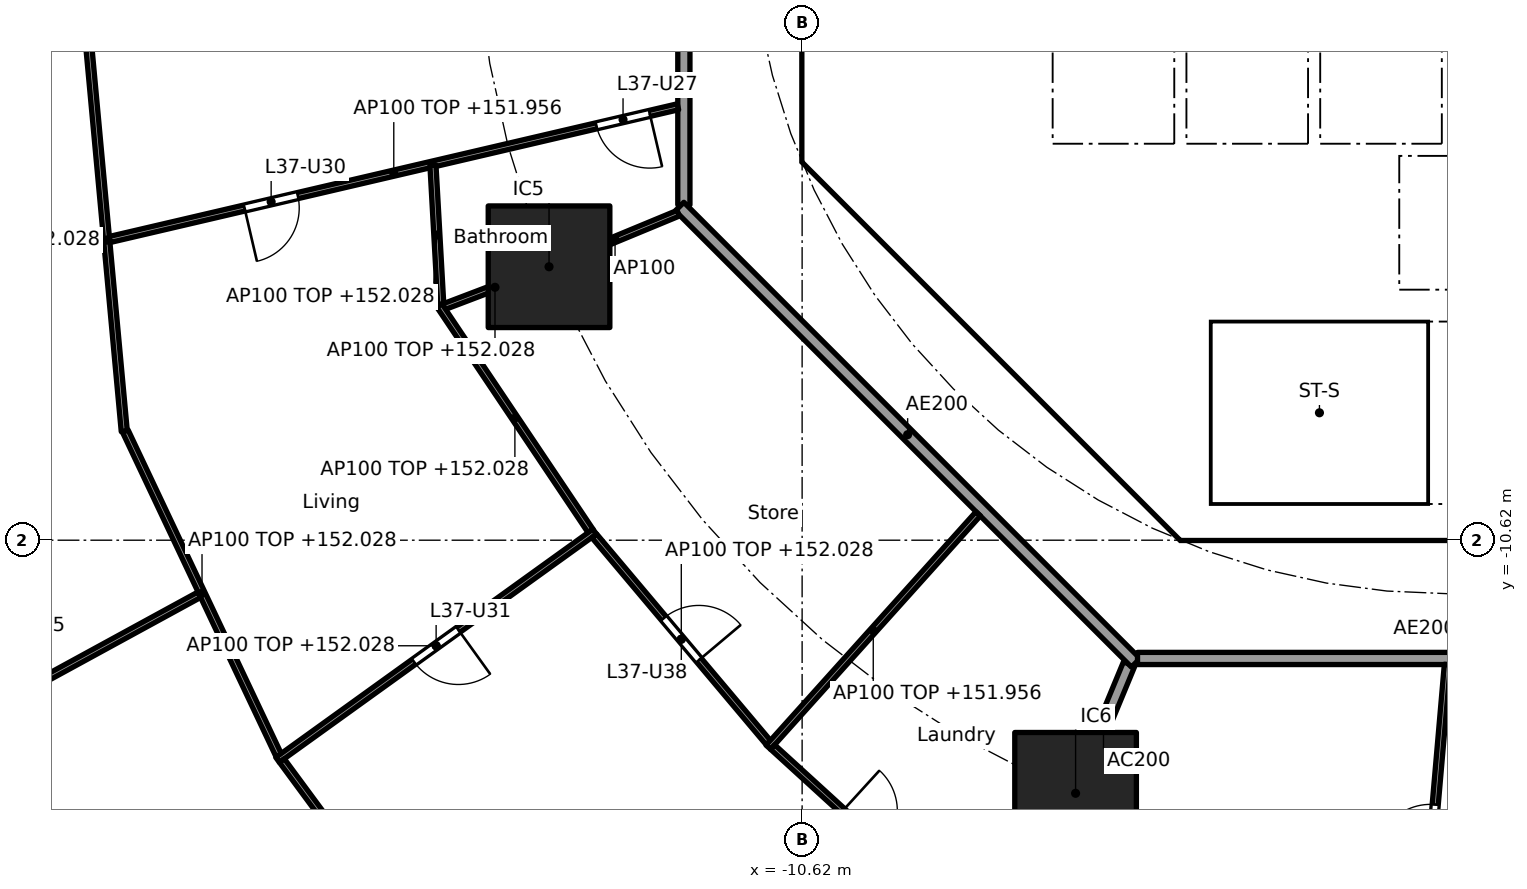
"""IFC4 building model, lengths in metres.
Left out: names, types, materials, properties, quantities, classifications, styles, units other than length and angle.
Written with IfcOpenShell. Run it as: python <this file> out.ifc"""

import sys

from ifc_helpers import new_model, si_unit, direction, frame, frame_2d, origin, origin_2d, place, context, subcontext, project, spatial, polyline, rectangle, outline, extrude, element, fill, save


model = new_model("IFC4")
c1 = context("Model", 3, precision=1e-05, world=origin(), true_north=direction((0.0, 1.0)))
c2 = subcontext(c1, "Body", "Model", "MODEL_VIEW")
j1 = project(units=[si_unit("LENGTHUNIT", "METRE"), si_unit("PLANEANGLEUNIT", "RADIAN")], contexts=[c1])
p1 = place(None, origin())
s1 = spatial("IfcSite", under=j1, at=p1, CompositionType="ELEMENT")
p2 = place(p1, origin())
s2 = spatial("IfcBuilding", under=s1, at=p2, CompositionType="ELEMENT")
p3 = place(p2, frame((0.0, 0.0, 149.2)))
s3 = spatial("IfcBuildingStorey", under=s2, at=p3, CompositionType="ELEMENT", Elevation=149.2)
for number, where, z_axis, x_axis in (
    (1, (-14.782, -6.123, 0.0), (0.0, 0.0, 1.0), (1.0, 0.0, 0.0)),
    (2, (-6.123, -14.782, 0.0), (0.0, 0.0, 1.0), (1.0, 0.0, 0.0)),
):
    element("IfcColumn", number, at=place(p3, frame(where, z_axis=z_axis, x_axis=x_axis)), inside=s3, PredefinedType="COLUMN", context=c2, shape_type="SweptSolid", body=[
        extrude(rectangle(XDim=2.0, YDim=2.0, at=origin_2d()), origin(), (0.0, 0.0, 1.0), 3.7),
    ])
p4 = place(p3, frame((-10.325, 3.801, 0.0), z_axis=(0.0, 0.0, 1.0), x_axis=(0.0, -1.0, 0.0)))
e3 = element("IfcWall", 3, at=p4, inside=s3, PredefinedType="SHEAR", context=c2, shape_type="SweptSolid", body=[
    extrude(rectangle(XDim=7.602, YDim=0.6, at=frame_2d((3.801, 0.0))), origin(), (0.0, 0.0, 1.0), 3.44),
])
p5 = place(p4, frame((0.651, 0.0, 0.0)))
e4 = element("IfcOpeningElement", 4, at=p5, cuts=e3, PredefinedType="OPENING", context=c2, shape_type="SweptSolid", body=[
    extrude(rectangle(XDim=1.5, YDim=2.1, at=frame_2d((0.75, 1.05))), frame((0.0, 0.31, 0.0), z_axis=(0.0, -1.0, 0.0), x_axis=(1.0, 0.0, 0.0)), (0.0, 0.0, 1.0), 0.62),
])
p6 = place(p4, frame((5.451, 0.0, 0.0)))
e5 = element("IfcOpeningElement", 5, at=p6, cuts=e3, PredefinedType="OPENING", context=c2, shape_type="SweptSolid", body=[
    extrude(rectangle(XDim=1.5, YDim=2.1, at=frame_2d((0.75, 1.05))), frame((0.0, 0.31, 0.0), z_axis=(0.0, -1.0, 0.0), x_axis=(1.0, 0.0, 0.0)), (0.0, 0.0, 1.0), 0.62),
])
p7 = place(p3, frame((-9.988, -4.613, 0.0), z_axis=(0.0, 0.0, 1.0), x_axis=(0.707106781187, -0.707106781187, 0.0)))
e6 = element("IfcWall", 6, at=p7, inside=s3, PredefinedType="SHEAR", context=c2, shape_type="SweptSolid", body=[
    extrude(rectangle(XDim=7.602, YDim=0.6, at=frame_2d((3.801, 0.0))), origin(), (0.0, 0.0, 1.0), 3.44),
])
p8 = place(p7, frame((6.151, 0.0, 0.0)))
e7 = element("IfcOpeningElement", 7, at=p8, cuts=e6, PredefinedType="OPENING", context=c2, shape_type="SweptSolid", body=[
    extrude(rectangle(XDim=1.1, YDim=2.1, at=frame_2d((0.55, 1.05))), frame((0.0, 0.31, 0.0), z_axis=(0.0, -1.0, 0.0), x_axis=(1.0, 0.0, 0.0)), (0.0, 0.0, 1.0), 0.62),
])
p9 = place(p3, frame((-7.4, -6.627, 0.0), z_axis=(0.0, 0.0, 1.0), x_axis=(0.0, 1.0, 0.0)))
e8 = element("IfcWall", 8, at=p9, inside=s3, PredefinedType="PARTITIONING", context=c2, shape_type="SweptSolid", body=[
    extrude(rectangle(XDim=2.527, YDim=0.15, at=frame_2d((1.263, 0.0))), origin(), (0.0, 0.0, 1.0), 3.44),
])
p10 = place(p9, frame((0.776, 0.0, 0.0)))
e9 = element("IfcOpeningElement", 9, at=p10, cuts=e8, PredefinedType="OPENING", context=c2, shape_type="SweptSolid", body=[
    extrude(rectangle(XDim=0.9, YDim=2.1, at=frame_2d((0.45, 1.05))), frame((0.0, 0.085, 0.0), z_axis=(0.0, -1.0, 0.0), x_axis=(1.0, 0.0, 0.0)), (0.0, 0.0, 1.0), 0.17),
])
p11 = place(p3, frame((-4.0, -6.5, 0.0), z_axis=(0.0, 0.0, 1.0), x_axis=(0.0, 1.0, 0.0)))
e10 = element("IfcWall", 10, at=p11, inside=s3, PredefinedType="SOLIDWALL", context=c2, shape_type="SweptSolid", body=[
    extrude(rectangle(XDim=2.2, YDim=0.2, at=frame_2d((1.1, 0.0))), origin(), (0.0, 0.0, 1.0), 3.44),
])
p12 = place(p11, frame((0.65, 0.0, 0.0)))
e11 = element("IfcOpeningElement", 11, at=p12, cuts=e10, PredefinedType="OPENING", context=c2, shape_type="SweptSolid", body=[
    extrude(rectangle(XDim=0.9, YDim=2.1, at=frame_2d((0.45, 1.05))), frame((0.0, 0.11, 0.0), z_axis=(0.0, -1.0, 0.0), x_axis=(1.0, 0.0, 0.0)), (0.0, 0.0, 1.0), 0.22),
])
p13 = place(p3, origin())
e12 = element("IfcWall", 12, at=p13, inside=s3, PredefinedType="SHEAR", context=c2, shape_type="SweptSolid", body=[
    extrude(outline(polyline([(-10.625, -3.801), (-10.025, -3.801), (-10.025, -4.152), (-9.776, -4.401), (-10.2, -4.825), (-10.625, -4.401), (-10.625, -3.801)])), origin(), (0.0, 0.0, 1.0), 3.44),
])
p14 = place(p3, origin())
e13 = element("IfcWall", 13, at=p14, inside=s3, PredefinedType="SHEAR", context=c2, shape_type="SweptSolid", body=[
    extrude(outline(polyline([(-4.152, -10.025), (4.152, -10.025), (4.401, -9.776), (4.825, -10.2), (4.401, -10.625), (-4.401, -10.625), (-4.825, -10.2), (-4.401, -9.776), (-4.152, -10.025)])), origin(), (0.0, 0.0, 1.0), 3.44),
])
p15 = place(p3, frame((-0.9, -6.5, 0.0), z_axis=(0.0, 0.0, 1.0), x_axis=(0.0, 1.0, 0.0)))
e14 = element("IfcWall", 14, at=p15, inside=s3, PredefinedType="SOLIDWALL", context=c2, shape_type="SweptSolid", body=[
    extrude(rectangle(XDim=2.2, YDim=0.2, at=frame_2d((1.1, 0.0))), origin(), (0.0, 0.0, 1.0), 3.44),
])
p16 = place(p3, origin())
e15 = element("IfcWall", 15, at=p16, inside=s3, PredefinedType="SOLIDWALL", context=c2, shape_type="SweptSolid", body=[
    extrude(outline(polyline([(-6.7, -2.1), (-6.5, -2.1), (-6.5, -4.1), (-4.5, -4.1), (-4.5, -2.1), (-4.3, -2.1), (-4.3, -4.1), (-2.3, -4.1), (-2.3, -2.1), (-2.1, -2.1), (-2.1, -4.1), (-0.1, -4.1), (-0.1, -2.1), (0.1, -2.1), (0.1, -4.1), (2.1, -4.1), (2.1, -2.1), (2.3, -2.1), (2.3, -4.1), (4.3, -4.1), (4.3, -2.1), (4.5, -2.1), (4.5, -4.1), (6.5, -4.1), (6.5, -2.1), (6.7, -2.1), (6.7, -4.3), (-6.7, -4.3), (-6.7, -2.1)])), origin(), (0.0, 0.0, 1.0), 3.44),
])
p17 = place(p3, frame((-10.025, -4.0, 0.0), z_axis=(0.0, 0.0, 1.0), x_axis=(1.0, 0.0, 0.0)))
e16 = element("IfcWall", 16, at=p17, inside=s3, PredefinedType="PARTITIONING", context=c2, shape_type="SweptSolid", body=[
    extrude(rectangle(XDim=3.325, YDim=0.2, at=frame_2d((1.662, 0.0))), origin(), (0.0, 0.0, 1.0), 3.44),
])
p18 = place(p3, origin())
e17 = element("IfcWall", 17, at=p18, inside=s3, PredefinedType="SOLIDWALL", context=c2, shape_type="SweptSolid", body=[
    extrude(outline(polyline([(-3.9, -10.025), (-4.1, -10.025), (-4.1, -7.025), (-3.9, -7.025), (-3.9, -10.025)])), origin(), (0.0, 0.0, 1.0), 3.44),
])
p19 = place(p3, origin())
e18 = element("IfcWall", 18, at=p19, inside=s3, PredefinedType="SOLIDWALL", context=c2, shape_type="SweptSolid", body=[
    extrude(outline(polyline([(4.1, -7.025), (-4.1, -7.025), (-4.1, -6.5), (4.1, -6.5), (4.1, -7.025)])), origin(), (0.0, 0.0, 1.0), 3.44),
])
p20 = place(p3, frame((-5.243, -12.657, 0.0), z_axis=(0.0, 0.0, 1.0), x_axis=(-0.382818775282, -0.923823460025, 0.0)))
e19 = element("IfcWall", 19, at=p20, inside=s3, PredefinedType="PARTITIONING", context=c2, shape_type="SweptSolid", body=[
    extrude(rectangle(XDim=2.201, YDim=0.2, at=frame_2d((1.101, 0.0))), origin(), (0.0, 0.0, 1.0), 3.44),
])
p21 = place(p3, frame((-6.149, -14.825, 0.0), z_axis=(0.0, 0.0, 1.0), x_axis=(-0.525406383516, -0.85085141603, 0.0)))
e20 = element("IfcWall", 20, at=p21, inside=s3, PredefinedType="PARTITIONING", context=c2, shape_type="SweptSolid", body=[
    extrude(rectangle(XDim=15.925, YDim=0.2, at=frame_2d((7.962, 0.0))), origin(), (0.0, 0.0, 1.0), 2.828),
])
p22 = place(p3, frame((-12.565, 5.304, 0.0), z_axis=(0.0, 0.0, 1.0), x_axis=(0.0, -1.0, 0.0)))
e21 = element("IfcWall", 21, at=p22, inside=s3, PredefinedType="PARTITIONING", context=c2, shape_type="SweptSolid", body=[
    extrude(rectangle(XDim=10.409, YDim=0.2, at=frame_2d((5.205, 0.0))), origin(), (0.0, 0.0, 1.0), 3.44),
])
p23 = place(p22, frame((6.539, 0.0, 0.0)))
e22 = element("IfcOpeningElement", 22, at=p23, cuts=e21, PredefinedType="OPENING", context=c2, shape_type="SweptSolid", body=[
    extrude(rectangle(XDim=1.0, YDim=2.1, at=frame_2d((0.5, 1.05))), frame((0.0, 0.11, 0.0), z_axis=(0.0, -1.0, 0.0), x_axis=(1.0, 0.0, 0.0)), (0.0, 0.0, 1.0), 0.22),
])
p24 = place(p3, frame((-12.635, -5.134, 0.0), z_axis=(0.0, 0.0, 1.0), x_axis=(0.707106781187, -0.707106781187, 0.0)))
e23 = element("IfcWall", 23, at=p24, inside=s3, PredefinedType="PARTITIONING", context=c2, shape_type="SweptSolid", body=[
    extrude(rectangle(XDim=10.609, YDim=0.2, at=frame_2d((5.305, 0.0))), origin(), (0.0, 0.0, 1.0), 3.44),
])
p25 = place(p3, frame((-5.104, -12.565, 0.0), z_axis=(0.0, 0.0, 1.0), x_axis=(1.0, 0.0, 0.0)))
e24 = element("IfcWall", 24, at=p25, inside=s3, PredefinedType="PARTITIONING", context=c2, shape_type="SweptSolid", body=[
    extrude(rectangle(XDim=10.409, YDim=0.2, at=frame_2d((5.205, 0.0))), origin(), (0.0, 0.0, 1.0), 3.44),
])
p26 = place(p25, frame((5.906, 0.0, 0.0)))
e25 = element("IfcOpeningElement", 25, at=p26, cuts=e24, PredefinedType="OPENING", context=c2, shape_type="SweptSolid", body=[
    extrude(rectangle(XDim=1.0, YDim=2.1, at=frame_2d((0.5, 1.05))), frame((0.0, 0.11, 0.0), z_axis=(0.0, -1.0, 0.0), x_axis=(1.0, 0.0, 0.0)), (0.0, 0.0, 1.0), 0.22),
])
p27 = place(p3, frame((-22.347, -2.542, 0.0), z_axis=(0.0, 0.0, 1.0), x_axis=(0.091783634244, -0.995778973711, 0.0)))
e26 = element("IfcWall", 26, at=p27, inside=s3, PredefinedType="PARTITIONING", context=c2, shape_type="SweptSolid", body=[
    extrude(rectangle(XDim=6.315, YDim=0.1, at=frame_2d((3.157, 0.0))), origin(), (0.0, 0.0, 1.0), 2.828),
])
p28 = place(p3, frame((-12.662, -3.492, 0.0), z_axis=(0.0, 0.0, 1.0), x_axis=(-0.973798787998, -0.227411346448, 0.0)))
e27 = element("IfcWall", 27, at=p28, inside=s3, PredefinedType="PARTITIONING", context=c2, shape_type="SweptSolid", body=[
    extrude(rectangle(XDim=9.598, YDim=0.1, at=frame_2d((4.799, 0.0))), origin(), (0.0, 0.0, 1.0), 2.756),
])
p29 = place(p28, frame((0.477, 0.0, 0.0)))
e28 = element("IfcOpeningElement", 28, at=p29, cuts=e27, PredefinedType="OPENING", context=c2, shape_type="SweptSolid", body=[
    extrude(rectangle(XDim=0.9, YDim=2.1, at=frame_2d((0.45, 1.05))), frame((0.0, 0.06, 0.0), z_axis=(0.0, -1.0, 0.0), x_axis=(1.0, 0.0, 0.0)), (0.0, 0.0, 1.0), 0.12),
])
p30 = place(p28, frame((6.42, 0.0, 0.0)))
e29 = element("IfcOpeningElement", 29, at=p30, cuts=e27, PredefinedType="OPENING", context=c2, shape_type="SweptSolid", body=[
    extrude(rectangle(XDim=0.9, YDim=2.1, at=frame_2d((0.45, 1.05))), frame((0.0, 0.06, 0.0), z_axis=(0.0, -1.0, 0.0), x_axis=(1.0, 0.0, 0.0)), (0.0, 0.0, 1.0), 0.12),
])
p31 = place(p3, frame((-16.691, -4.454, 0.0), z_axis=(0.0, 0.0, 1.0), x_axis=(0.05596405841, -0.998432784, 0.0)))
e30 = element("IfcWall", 30, at=p31, inside=s3, PredefinedType="PARTITIONING", context=c2, shape_type="SweptSolid", body=[
    extrude(rectangle(XDim=2.299, YDim=0.1, at=frame_2d((1.149, 0.0))), origin(), (0.0, 0.0, 1.0), 2.828),
])
p32 = place(p3, frame((-12.657, -5.243, 0.0), z_axis=(0.0, 0.0, 1.0), x_axis=(-0.923864733477, -0.382719158442, 0.0)))
e31 = element("IfcWall", 31, at=p32, inside=s3, PredefinedType="PARTITIONING", context=c2, shape_type="SweptSolid", body=[
    extrude(rectangle(XDim=2.25, YDim=0.1, at=frame_2d((1.125, 0.0))), origin(), (0.0, 0.0, 1.0), 3.44),
])
p33 = place(p3, frame((-14.829, -6.141, 0.0), z_axis=(0.0, 0.0, 1.0), x_axis=(-0.934704367514, -0.355426146128, 0.0)))
e32 = element("IfcWall", 32, at=p33, inside=s3, PredefinedType="PARTITIONING", context=c2, shape_type="SweptSolid", body=[
    extrude(rectangle(XDim=1.802, YDim=0.1, at=frame_2d((0.901, 0.0))), origin(), (0.0, 0.0, 1.0), 2.828),
])
p34 = place(p3, frame((-16.587, -6.757, 0.0), z_axis=(0.0, 0.0, 1.0), x_axis=(0.55699383956, -0.830516623971, 0.0)))
e33 = element("IfcWall", 33, at=p34, inside=s3, PredefinedType="PARTITIONING", context=c2, shape_type="SweptSolid", body=[
    extrude(rectangle(XDim=4.467, YDim=0.1, at=frame_2d((2.233, 0.0))), origin(), (0.0, 0.0, 1.0), 2.828),
])
p35 = place(p3, frame((-21.75, -8.826, 0.0), z_axis=(0.0, 0.0, 1.0), x_axis=(0.427739388908, -0.903902104863, 0.0)))
e34 = element("IfcWall", 34, at=p35, inside=s3, PredefinedType="PARTITIONING", context=c2, shape_type="SweptSolid", body=[
    extrude(rectangle(XDim=5.899, YDim=0.1, at=frame_2d((2.949, 0.0))), origin(), (0.0, 0.0, 1.0), 2.828),
])
p36 = place(p3, frame((-20.533, -11.516, 0.0), z_axis=(0.0, 0.0, 1.0), x_axis=(-0.877731656478, -0.479152521872, 0.0)))
e35 = element("IfcWall", 35, at=p36, inside=s3, PredefinedType="PARTITIONING", context=c2, shape_type="SweptSolid", body=[
    extrude(rectangle(XDim=6.548, YDim=0.1, at=frame_2d((3.274, 0.0))), origin(), (0.0, 0.0, 1.0), 2.905),
])
p37 = place(p3, frame((-14.031, -10.479, 0.0), z_axis=(0.0, 0.0, 1.0), x_axis=(-0.811653955345, -0.584138559567, 0.0)))
e36 = element("IfcWall", 36, at=p37, inside=s3, PredefinedType="PARTITIONING", context=c2, shape_type="SweptSolid", body=[
    extrude(rectangle(XDim=6.426, YDim=0.1, at=frame_2d((3.213, 0.0))), origin(), (0.0, 0.0, 1.0), 2.828),
])
p38 = place(p37, frame((2.763, 0.0, 0.0)))
e37 = element("IfcOpeningElement", 37, at=p38, cuts=e36, PredefinedType="OPENING", context=c2, shape_type="SweptSolid", body=[
    extrude(rectangle(XDim=0.9, YDim=2.1, at=frame_2d((0.45, 1.05))), frame((0.0, 0.06, 0.0), z_axis=(0.0, -1.0, 0.0), x_axis=(1.0, 0.0, 0.0)), (0.0, 0.0, 1.0), 0.12),
])
p39 = place(p3, frame((-14.04, -10.547, 0.0), z_axis=(0.0, 0.0, 1.0), x_axis=(0.644036028289, -0.764995159635, 0.0)))
e38 = element("IfcWall", 38, at=p39, inside=s3, PredefinedType="PARTITIONING", context=c2, shape_type="SweptSolid", body=[
    extrude(rectangle(XDim=4.448, YDim=0.1, at=frame_2d((2.224, 0.0))), origin(), (0.0, 0.0, 1.0), 2.828),
])
p40 = place(p39, frame((1.774, 0.0, 0.0)))
e39 = element("IfcOpeningElement", 39, at=p40, cuts=e38, PredefinedType="OPENING", context=c2, shape_type="SweptSolid", body=[
    extrude(rectangle(XDim=0.9, YDim=2.1, at=frame_2d((0.45, 1.05))), frame((0.0, 0.06, 0.0), z_axis=(0.0, -1.0, 0.0), x_axis=(1.0, 0.0, 0.0)), (0.0, 0.0, 1.0), 0.12),
])
p41 = place(p3, frame((-19.176, -14.244, 0.0), z_axis=(0.0, 0.0, 1.0), x_axis=(0.593532053206, -0.80481035146, 0.0)))
e40 = element("IfcWall", 40, at=p41, inside=s3, PredefinedType="PARTITIONING", context=c2, shape_type="SweptSolid", body=[
    extrude(rectangle(XDim=5.876, YDim=0.1, at=frame_2d((2.938, 0.0))), origin(), (0.0, 0.0, 1.0), 2.828),
])
p42 = place(p41, frame((2.488, 0.0, 0.0)))
e41 = element("IfcOpeningElement", 41, at=p42, cuts=e40, PredefinedType="OPENING", context=c2, shape_type="SweptSolid", body=[
    extrude(rectangle(XDim=0.9, YDim=2.1, at=frame_2d((0.45, 1.05))), frame((0.0, 0.06, 0.0), z_axis=(0.0, -1.0, 0.0), x_axis=(1.0, 0.0, 0.0)), (0.0, 0.0, 1.0), 0.12),
])
p43 = place(p3, frame((-7.725, -10.186, 0.0), z_axis=(0.0, 0.0, 1.0), x_axis=(-0.668483825034, -0.743726680756, 0.0)))
e42 = element("IfcWall", 42, at=p43, inside=s3, PredefinedType="PARTITIONING", context=c2, shape_type="SweptSolid", body=[
    extrude(rectangle(XDim=5.162, YDim=0.1, at=frame_2d((2.581, 0.0))), origin(), (0.0, 0.0, 1.0), 2.756),
])
p44 = place(p3, frame((-11.105, -14.021, 0.0), z_axis=(0.0, 0.0, 1.0), x_axis=(0.738880014758, -0.673837015747, 0.0)))
e43 = element("IfcWall", 43, at=p44, inside=s3, PredefinedType="PARTITIONING", context=c2, shape_type="SweptSolid", body=[
    extrude(rectangle(XDim=4.621, YDim=0.1, at=frame_2d((2.31, 0.0))), origin(), (0.0, 0.0, 1.0), 2.828),
])
p45 = place(p44, frame((1.558, 0.0, 0.0)))
e44 = element("IfcOpeningElement", 44, at=p45, cuts=e43, PredefinedType="OPENING", context=c2, shape_type="SweptSolid", body=[
    extrude(rectangle(XDim=0.9, YDim=2.1, at=frame_2d((0.45, 1.05))), frame((0.0, 0.06, 0.0), z_axis=(0.0, -1.0, 0.0), x_axis=(1.0, 0.0, 0.0)), (0.0, 0.0, 1.0), 0.12),
])
p46 = place(p3, frame((-0.009, -12.664, 0.0), z_axis=(0.0, 0.0, 1.0), x_axis=(-0.086431005932, -0.996257838721, 0.0)))
e45 = element("IfcWall", 45, at=p46, inside=s3, PredefinedType="PARTITIONING", context=c2, shape_type="SweptSolid", body=[
    extrude(rectangle(XDim=19.68, YDim=0.1, at=frame_2d((9.84, 0.0))), origin(), (0.0, 0.0, 1.0), 2.756),
])
p47 = place(p46, frame((2.312, 0.0, 0.0)))
e46 = element("IfcOpeningElement", 46, at=p47, cuts=e45, PredefinedType="OPENING", context=c2, shape_type="SweptSolid", body=[
    extrude(rectangle(XDim=0.9, YDim=2.1, at=frame_2d((0.45, 1.05))), frame((0.0, 0.06, 0.0), z_axis=(0.0, -1.0, 0.0), x_axis=(1.0, 0.0, 0.0)), (0.0, 0.0, 1.0), 0.12),
])
p48 = place(p46, frame((8.718, 0.0, 0.0)))
e47 = element("IfcOpeningElement", 47, at=p48, cuts=e45, PredefinedType="OPENING", context=c2, shape_type="SweptSolid", body=[
    extrude(rectangle(XDim=0.9, YDim=2.1, at=frame_2d((0.45, 1.05))), frame((0.0, 0.06, 0.0), z_axis=(0.0, -1.0, 0.0), x_axis=(1.0, 0.0, 0.0)), (0.0, 0.0, 1.0), 0.12),
])
p49 = place(p10, origin())
e48 = element("IfcDoor", 48, at=p49, inside=s3, OperationType="SINGLE_SWING_LEFT", PredefinedType="DOOR", context=c2, shape_type="SweptSolid", body=[
    extrude(rectangle(XDim=0.9, YDim=2.1, at=frame_2d((0.45, 1.05))), frame((0.0, 0.025, 0.0), z_axis=(0.0, -1.0, 0.0), x_axis=(1.0, 0.0, 0.0)), (0.0, 0.0, 1.0), 0.05),
])
fill(e9, e48)
p50 = place(p12, frame((0.9, 0.0, 0.0), x_axis=(-1.0, 0.0, 0.0)))
e49 = element("IfcDoor", 49, at=p50, inside=s3, OperationType="SINGLE_SWING_LEFT", PredefinedType="DOOR", context=c2, shape_type="SweptSolid", body=[
    extrude(rectangle(XDim=0.9, YDim=2.1, at=frame_2d((0.45, 1.05))), frame((0.0, 0.025, 0.0), z_axis=(0.0, -1.0, 0.0), x_axis=(1.0, 0.0, 0.0)), (0.0, 0.0, 1.0), 0.05),
])
fill(e11, e49)
p51 = place(p6, origin())
e50 = element("IfcDoor", 50, at=p51, inside=s3, OperationType="DOUBLE_DOOR_SINGLE_SWING", PredefinedType="DOOR", context=c2, shape_type="SweptSolid", body=[
    extrude(rectangle(XDim=1.5, YDim=2.1, at=frame_2d((0.75, 1.05))), frame((0.0, 0.025, 0.0), z_axis=(0.0, -1.0, 0.0), x_axis=(1.0, 0.0, 0.0)), (0.0, 0.0, 1.0), 0.05),
])
fill(e5, e50)
p52 = place(p8, origin())
e51 = element("IfcDoor", 51, at=p52, inside=s3, OperationType="SINGLE_SWING_LEFT", PredefinedType="DOOR", context=c2, shape_type="SweptSolid", body=[
    extrude(rectangle(XDim=1.1, YDim=2.1, at=frame_2d((0.55, 1.05))), frame((0.0, 0.025, 0.0), z_axis=(0.0, -1.0, 0.0), x_axis=(1.0, 0.0, 0.0)), (0.0, 0.0, 1.0), 0.05),
])
fill(e7, e51)
p53 = place(p47, frame((0.9, 0.0, 0.0), x_axis=(-1.0, 0.0, 0.0)))
e52 = element("IfcDoor", 52, at=p53, inside=s3, OperationType="SINGLE_SWING_LEFT", PredefinedType="DOOR", context=c2, shape_type="SweptSolid", body=[
    extrude(rectangle(XDim=0.9, YDim=2.1, at=frame_2d((0.45, 1.05))), frame((0.0, 0.025, 0.0), z_axis=(0.0, -1.0, 0.0), x_axis=(1.0, 0.0, 0.0)), (0.0, 0.0, 1.0), 0.05),
])
fill(e46, e52)
p54 = place(p29, origin())
e53 = element("IfcDoor", 53, at=p54, inside=s3, OperationType="SINGLE_SWING_LEFT", PredefinedType="DOOR", context=c2, shape_type="SweptSolid", body=[
    extrude(rectangle(XDim=0.9, YDim=2.1, at=frame_2d((0.45, 1.05))), frame((0.0, 0.025, 0.0), z_axis=(0.0, -1.0, 0.0), x_axis=(1.0, 0.0, 0.0)), (0.0, 0.0, 1.0), 0.05),
])
fill(e28, e53)
p55 = place(p30, origin())
e54 = element("IfcDoor", 54, at=p55, inside=s3, OperationType="SINGLE_SWING_RIGHT", PredefinedType="DOOR", context=c2, shape_type="SweptSolid", body=[
    extrude(rectangle(XDim=0.9, YDim=2.1, at=frame_2d((0.45, 1.05))), frame((0.0, 0.025, 0.0), z_axis=(0.0, -1.0, 0.0), x_axis=(1.0, 0.0, 0.0)), (0.0, 0.0, 1.0), 0.05),
])
fill(e29, e54)
p56 = place(p38, origin())
e55 = element("IfcDoor", 55, at=p56, inside=s3, OperationType="SINGLE_SWING_LEFT", PredefinedType="DOOR", context=c2, shape_type="SweptSolid", body=[
    extrude(rectangle(XDim=0.9, YDim=2.1, at=frame_2d((0.45, 1.05))), frame((0.0, 0.025, 0.0), z_axis=(0.0, -1.0, 0.0), x_axis=(1.0, 0.0, 0.0)), (0.0, 0.0, 1.0), 0.05),
])
fill(e37, e55)
p57 = place(p40, origin())
e56 = element("IfcDoor", 56, at=p57, inside=s3, OperationType="SINGLE_SWING_RIGHT", PredefinedType="DOOR", context=c2, shape_type="SweptSolid", body=[
    extrude(rectangle(XDim=0.9, YDim=2.1, at=frame_2d((0.45, 1.05))), frame((0.0, 0.025, 0.0), z_axis=(0.0, -1.0, 0.0), x_axis=(1.0, 0.0, 0.0)), (0.0, 0.0, 1.0), 0.05),
])
fill(e39, e56)
save(model, sys.argv[1])
